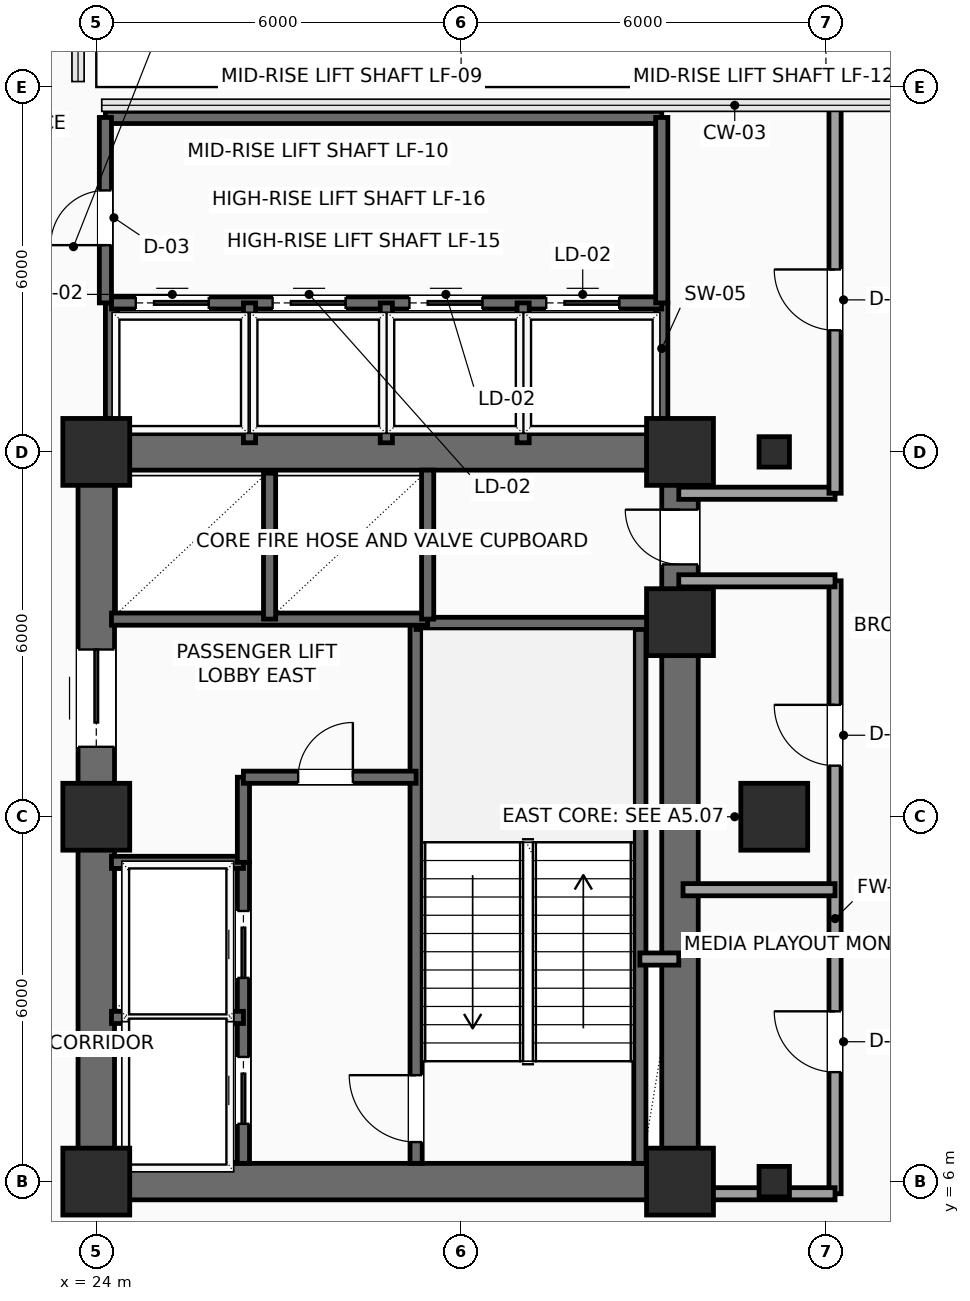
"""IFC4 building model, lengths in metres.
Left out: names, types, materials, properties, quantities, classifications, styles, units other than length and angle.
Written with IfcOpenShell. Run it as: python <this file> out.ifc"""

import sys

from ifc_helpers import new_model, si_unit, direction, frame, frame_2d, origin, origin_2d, place, context, subcontext, project, spatial, rectangle, hollow_rectangle, extrude, element, fill, save


model = new_model("IFC4")
c1 = context("Model", 3, precision=1e-05, world=origin(), true_north=direction((0.0, 1.0)))
c2 = subcontext(c1, "Body", "Model", "MODEL_VIEW")
j1 = project(units=[si_unit("LENGTHUNIT", "METRE"), si_unit("PLANEANGLEUNIT", "RADIAN")], contexts=[c1])
p1 = place(None, origin())
s1 = spatial("IfcSite", under=j1, at=p1, CompositionType="ELEMENT")
p2 = place(p1, origin())
s2 = spatial("IfcBuilding", under=s1, at=p2, CompositionType="ELEMENT")
p3 = place(p2, frame((0.0, 0.0, 119.4)))
s3 = spatial("IfcBuildingStorey", under=s2, at=p3, CompositionType="ELEMENT", Elevation=119.4)
for number, where, z_axis, x_axis in (
    (1, (24.0, 6.0, 0.0), (0.0, 0.0, 1.0), (1.0, 0.0, 0.0)),
    (2, (24.0, 12.0, 0.0), (0.0, 0.0, 1.0), (1.0, 0.0, 0.0)),
    (3, (24.0, 18.0, 0.0), (0.0, 0.0, 1.0), (1.0, 0.0, 0.0)),
    (4, (33.6, 6.0, 0.0), (0.0, 0.0, 1.0), (1.0, 0.0, 0.0)),
    (5, (33.6, 15.2, 0.0), (0.0, 0.0, 1.0), (1.0, 0.0, 0.0)),
    (6, (33.6, 18.0, 0.0), (0.0, 0.0, 1.0), (1.0, 0.0, 0.0)),
):
    element("IfcColumn", number, at=place(p3, frame(where, z_axis=z_axis, x_axis=x_axis)), inside=s3, PredefinedType="COLUMN", context=c2, shape_type="SweptSolid", body=[
        extrude(rectangle(XDim=1.1, YDim=1.1, at=origin_2d()), origin(), (0.0, 0.0, 1.0), 3.75),
    ])
p4 = place(p3, frame((35.15, 6.0, 0.0), z_axis=(0.0, 0.0, 1.0), x_axis=(1.0, 0.0, 0.0)))
e7 = element("IfcColumn", 7, at=p4, inside=s3, PredefinedType="COLUMN", context=c2, shape_type="SweptSolid", body=[
    extrude(hollow_rectangle(XDim=0.5, YDim=0.5, WallThickness=0.025, InnerFilletRadius=0.025, OuterFilletRadius=0.04, at=origin_2d()), origin(), (0.0, 0.0, 1.0), 3.75),
])
p5 = place(p3, frame((35.15, 12.0, 0.0), z_axis=(0.0, 0.0, 1.0), x_axis=(1.0, 0.0, 0.0)))
e8 = element("IfcColumn", 8, at=p5, inside=s3, PredefinedType="COLUMN", context=c2, shape_type="SweptSolid", body=[
    extrude(rectangle(XDim=1.1, YDim=1.1, at=origin_2d()), origin(), (0.0, 0.0, 1.0), 3.75),
])
p6 = place(p3, frame((35.15, 18.0, 0.0), z_axis=(0.0, 0.0, 1.0), x_axis=(1.0, 0.0, 0.0)))
e9 = element("IfcColumn", 9, at=p6, inside=s3, PredefinedType="COLUMN", context=c2, shape_type="SweptSolid", body=[
    extrude(hollow_rectangle(XDim=0.5, YDim=0.5, WallThickness=0.025, InnerFilletRadius=0.025, OuterFilletRadius=0.04, at=origin_2d()), origin(), (0.0, 0.0, 1.0), 3.75),
])
for number, where, z_axis, x_axis in (
    (10, (24.0, 6.0, 0.0), (0.0, 0.0, 1.0), (1.0, 0.0, 0.0)),
    (11, (24.0, 18.0, 0.0), (0.0, 0.0, 1.0), (1.0, 0.0, 0.0)),
):
    element("IfcWall", number, at=place(p3, frame(where, z_axis=z_axis, x_axis=x_axis)), inside=s3, PredefinedType="SHEAR", context=c2, shape_type="SweptSolid", body=[
        extrude(rectangle(XDim=9.6, YDim=0.6, at=frame_2d((4.8, 0.0))), origin(), (0.0, 0.0, 1.0), 3.525),
    ])
p7 = place(p3, frame((24.0, 6.0, 0.0), z_axis=(0.0, 0.0, 1.0), x_axis=(0.0, 1.0, 0.0)))
e12 = element("IfcWall", 12, at=p7, inside=s3, PredefinedType="SHEAR", context=c2, shape_type="SweptSolid", body=[
    extrude(rectangle(XDim=12.0, YDim=0.6, at=frame_2d((6.0, 0.0))), origin(), (0.0, 0.0, 1.0), 3.525),
])
p8 = place(p7, frame((7.15, 0.0, 0.0)))
e13 = element("IfcOpeningElement", 13, at=p8, cuts=e12, PredefinedType="OPENING", context=c2, shape_type="SweptSolid", body=[
    extrude(rectangle(XDim=1.6, YDim=2.3, at=frame_2d((0.8, 1.15))), frame((0.0, 0.31, 0.0), z_axis=(0.0, -1.0, 0.0), x_axis=(1.0, 0.0, 0.0)), (0.0, 0.0, 1.0), 0.62),
])
p9 = place(p3, frame((33.6, 6.0, 0.0), z_axis=(0.0, 0.0, 1.0), x_axis=(0.0, 1.0, 0.0)))
e14 = element("IfcWall", 14, at=p9, inside=s3, PredefinedType="SHEAR", context=c2, shape_type="SweptSolid", body=[
    extrude(rectangle(XDim=12.0, YDim=0.6, at=frame_2d((6.0, 0.0))), origin(), (0.0, 0.0, 1.0), 3.525),
])
p10 = place(p9, frame((10.15, 0.0, 0.0)))
e15 = element("IfcOpeningElement", 15, at=p10, cuts=e14, PredefinedType="OPENING", context=c2, shape_type="SweptSolid", body=[
    extrude(rectangle(XDim=0.9, YDim=2.15, at=frame_2d((0.45, 1.075))), frame((0.0, 0.31, 0.0), z_axis=(0.0, -1.0, 0.0), x_axis=(1.0, 0.0, 0.0)), (0.0, 0.0, 1.0), 0.62),
])
p11 = place(p3, frame((29.26, 6.3, 0.0), z_axis=(0.0, 0.0, 1.0), x_axis=(0.0, 1.0, 0.0)))
e16 = element("IfcWall", 16, at=p11, inside=s3, PredefinedType="SHEAR", context=c2, shape_type="SweptSolid", body=[
    extrude(rectangle(XDim=8.88, YDim=0.2, at=frame_2d((4.44, 0.0))), origin(), (0.0, 0.0, 1.0), 3.525),
])
p12 = place(p11, frame((0.35, 0.0, 0.0)))
e17 = element("IfcOpeningElement", 17, at=p12, cuts=e16, PredefinedType="OPENING", context=c2, shape_type="SweptSolid", body=[
    extrude(rectangle(XDim=1.1, YDim=2.2, at=frame_2d((0.55, 1.1))), frame((0.0, 0.11, 0.0), z_axis=(0.0, -1.0, 0.0), x_axis=(1.0, 0.0, 0.0)), (0.0, 0.0, 1.0), 0.22),
])
p13 = place(p3, frame((32.94, 6.3, 0.0), z_axis=(0.0, 0.0, 1.0), x_axis=(0.0, 1.0, 0.0)))
e18 = element("IfcWall", 18, at=p13, inside=s3, PredefinedType="SHEAR", context=c2, shape_type="SweptSolid", body=[
    extrude(rectangle(XDim=8.88, YDim=0.2, at=frame_2d((4.44, 0.0))), origin(), (0.0, 0.0, 1.0), 3.525),
])
p14 = place(p3, frame((29.26, 15.18, 0.0), z_axis=(0.0, 0.0, 1.0), x_axis=(1.0, 0.0, 0.0)))
e19 = element("IfcWall", 19, at=p14, inside=s3, PredefinedType="SHEAR", context=c2, shape_type="SweptSolid", body=[
    extrude(rectangle(XDim=4.04, YDim=0.2, at=frame_2d((2.02, 0.0))), origin(), (0.0, 0.0, 1.0), 3.525),
])
p15 = place(p3, frame((26.42, 6.3, 0.0), z_axis=(0.0, 0.0, 1.0), x_axis=(0.0, 1.0, 0.0)))
e20 = element("IfcWall", 20, at=p15, inside=s3, PredefinedType="SHEAR", context=c2, shape_type="SweptSolid", body=[
    extrude(rectangle(XDim=4.95, YDim=0.2, at=frame_2d((2.475, 0.0))), origin(), (0.0, 0.0, 1.0), 3.525),
])
p16 = place(p15, frame((0.65, 0.0, 0.0)))
e21 = element("IfcOpeningElement", 21, at=p16, cuts=e20, PredefinedType="OPENING", context=c2, shape_type="SweptSolid", body=[
    extrude(rectangle(XDim=1.1, YDim=2.2, at=frame_2d((0.55, 1.1))), frame((0.0, 0.11, 0.0), z_axis=(0.0, -1.0, 0.0), x_axis=(1.0, 0.0, 0.0)), (0.0, 0.0, 1.0), 0.22),
])
p17 = place(p15, frame((3.05, 0.0, 0.0)))
e22 = element("IfcOpeningElement", 22, at=p17, cuts=e20, PredefinedType="OPENING", context=c2, shape_type="SweptSolid", body=[
    extrude(rectangle(XDim=1.1, YDim=2.2, at=frame_2d((0.55, 1.1))), frame((0.0, 0.11, 0.0), z_axis=(0.0, -1.0, 0.0), x_axis=(1.0, 0.0, 0.0)), (0.0, 0.0, 1.0), 0.22),
])
for number, where, z_axis, x_axis in (
    (23, (24.25, 8.7, 0.0), (0.0, 0.0, 1.0), (1.0, 0.0, 0.0)),
    (24, (24.25, 11.25, 0.0), (0.0, 0.0, 1.0), (1.0, 0.0, 0.0)),
):
    element("IfcWall", number, at=place(p3, frame(where, z_axis=z_axis, x_axis=x_axis)), inside=s3, PredefinedType="SHEAR", context=c2, shape_type="SweptSolid", body=[
        extrude(rectangle(XDim=2.17, YDim=0.2, at=frame_2d((1.085, 0.0))), origin(), (0.0, 0.0, 1.0), 3.525),
    ])
p18 = place(p3, frame((26.42, 11.25, 0.0), z_axis=(0.0, 0.0, 1.0), x_axis=(0.0, 1.0, 0.0)))
e25 = element("IfcWall", 25, at=p18, inside=s3, PredefinedType="SHEAR", context=c2, shape_type="SweptSolid", body=[
    extrude(rectangle(XDim=1.4, YDim=0.2, at=frame_2d((0.7, 0.0))), origin(), (0.0, 0.0, 1.0), 3.525),
])
p19 = place(p3, frame((26.42, 12.65, 0.0), z_axis=(0.0, 0.0, 1.0), x_axis=(1.0, 0.0, 0.0)))
e26 = element("IfcWall", 26, at=p19, inside=s3, PredefinedType="SHEAR", context=c2, shape_type="SweptSolid", body=[
    extrude(rectangle(XDim=2.84, YDim=0.2, at=frame_2d((1.42, 0.0))), origin(), (0.0, 0.0, 1.0), 3.525),
])
p20 = place(p19, frame((0.9, 0.0, 0.0)))
e27 = element("IfcOpeningElement", 27, at=p20, cuts=e26, PredefinedType="OPENING", context=c2, shape_type="SweptSolid", body=[
    extrude(rectangle(XDim=0.9, YDim=2.15, at=frame_2d((0.45, 1.075))), frame((0.0, 0.11, 0.0), z_axis=(0.0, -1.0, 0.0), x_axis=(1.0, 0.0, 0.0)), (0.0, 0.0, 1.0), 0.22),
])
p21 = place(p3, frame((32.94, 9.66, 0.0), z_axis=(0.0, 0.0, 1.0), x_axis=(1.0, 0.0, 0.0)))
e28 = element("IfcWall", 28, at=p21, inside=s3, PredefinedType="SOLIDWALL", context=c2, shape_type="SweptSolid", body=[
    extrude(rectangle(XDim=0.64, YDim=0.2, at=frame_2d((0.32, 0.0))), origin(), (0.0, 0.0, 1.0), 3.525),
])
p22 = place(p3, frame((24.25, 15.25, 0.0), z_axis=(0.0, 0.0, 1.0), x_axis=(1.0, 0.0, 0.0)))
e29 = element("IfcWall", 29, at=p22, inside=s3, PredefinedType="SHEAR", context=c2, shape_type="SweptSolid", body=[
    extrude(rectangle(XDim=5.2, YDim=0.2, at=frame_2d((2.6, 0.0))), origin(), (0.0, 0.0, 1.0), 3.525),
])
p23 = place(p3, frame((26.85, 15.25, 0.0), z_axis=(0.0, 0.0, 1.0), x_axis=(0.0, 1.0, 0.0)))
e30 = element("IfcWall", 30, at=p23, inside=s3, PredefinedType="SHEAR", context=c2, shape_type="SweptSolid", body=[
    extrude(rectangle(XDim=2.4, YDim=0.2, at=frame_2d((1.2, 0.0))), origin(), (0.0, 0.0, 1.0), 3.525),
])
p24 = place(p3, frame((29.45, 15.25, 0.0), z_axis=(0.0, 0.0, 1.0), x_axis=(0.0, 1.0, 0.0)))
e31 = element("IfcWall", 31, at=p24, inside=s3, PredefinedType="SHEAR", context=c2, shape_type="SweptSolid", body=[
    extrude(rectangle(XDim=2.45, YDim=0.2, at=frame_2d((1.225, 0.0))), origin(), (0.0, 0.0, 1.0), 3.525),
])
for number, where, z_axis, x_axis in (
    (32, (33.3, 18.1, 0.0), (0.0, 0.0, 1.0), (0.0, 1.0, 0.0)),
    (33, (24.25, 18.1, 0.0), (0.0, 0.0, 1.0), (0.0, 1.0, 0.0)),
):
    element("IfcWall", number, at=place(p3, frame(where, z_axis=z_axis, x_axis=x_axis)), inside=s3, PredefinedType="SHEAR", context=c2, shape_type="SweptSolid", body=[
        extrude(rectangle(XDim=2.35, YDim=0.2, at=frame_2d((1.175, 0.0))), origin(), (0.0, 0.0, 1.0), 3.525),
    ])
p25 = place(p3, frame((24.25, 20.45, 0.0), z_axis=(0.0, 0.0, 1.0), x_axis=(1.0, 0.0, 0.0)))
e34 = element("IfcWall", 34, at=p25, inside=s3, PredefinedType="SHEAR", context=c2, shape_type="SweptSolid", body=[
    extrude(rectangle(XDim=9.05, YDim=0.2, at=frame_2d((4.525, 0.0))), origin(), (0.0, 0.0, 1.0), 3.525),
])
p26 = place(p25, frame((0.4, 0.0, 0.0)))
e35 = element("IfcOpeningElement", 35, at=p26, cuts=e34, PredefinedType="OPENING", context=c2, shape_type="SweptSolid", body=[
    extrude(rectangle(XDim=1.2, YDim=2.2, at=frame_2d((0.6, 1.1))), frame((0.0, 0.11, 0.0), z_axis=(0.0, -1.0, 0.0), x_axis=(1.0, 0.0, 0.0)), (0.0, 0.0, 1.0), 0.22),
])
p27 = place(p25, frame((2.65, 0.0, 0.0)))
e36 = element("IfcOpeningElement", 36, at=p27, cuts=e34, PredefinedType="OPENING", context=c2, shape_type="SweptSolid", body=[
    extrude(rectangle(XDim=1.2, YDim=2.2, at=frame_2d((0.6, 1.1))), frame((0.0, 0.11, 0.0), z_axis=(0.0, -1.0, 0.0), x_axis=(1.0, 0.0, 0.0)), (0.0, 0.0, 1.0), 0.22),
])
p28 = place(p25, frame((4.9, 0.0, 0.0)))
e37 = element("IfcOpeningElement", 37, at=p28, cuts=e34, PredefinedType="OPENING", context=c2, shape_type="SweptSolid", body=[
    extrude(rectangle(XDim=1.2, YDim=2.2, at=frame_2d((0.6, 1.1))), frame((0.0, 0.11, 0.0), z_axis=(0.0, -1.0, 0.0), x_axis=(1.0, 0.0, 0.0)), (0.0, 0.0, 1.0), 0.22),
])
p29 = place(p25, frame((7.15, 0.0, 0.0)))
e38 = element("IfcOpeningElement", 38, at=p29, cuts=e34, PredefinedType="OPENING", context=c2, shape_type="SweptSolid", body=[
    extrude(rectangle(XDim=1.2, YDim=2.2, at=frame_2d((0.6, 1.1))), frame((0.0, 0.11, 0.0), z_axis=(0.0, -1.0, 0.0), x_axis=(1.0, 0.0, 0.0)), (0.0, 0.0, 1.0), 0.22),
])
for number, where, z_axis, x_axis in (
    (39, (26.52, 18.15, 0.0), (0.0, 0.0, 1.0), (0.0, 1.0, 0.0)),
    (40, (28.77, 18.15, 0.0), (0.0, 0.0, 1.0), (0.0, 1.0, 0.0)),
    (41, (31.02, 18.15, 0.0), (0.0, 0.0, 1.0), (0.0, 1.0, 0.0)),
):
    element("IfcWall", number, at=place(p3, frame(where, z_axis=z_axis, x_axis=x_axis)), inside=s3, PredefinedType="SHEAR", context=c2, shape_type="SweptSolid", body=[
        extrude(rectangle(XDim=2.3, YDim=0.2, at=frame_2d((1.15, 0.0))), origin(), (0.0, 0.0, 1.0), 3.525),
    ])
p30 = place(p3, frame((24.15, 23.5, 0.0), z_axis=(0.0, 0.0, 1.0), x_axis=(1.0, 0.0, 0.0)))
e42 = element("IfcWall", 42, at=p30, inside=s3, PredefinedType="SHEAR", context=c2, shape_type="SweptSolid", body=[
    extrude(rectangle(XDim=9.15, YDim=0.2, at=frame_2d((4.575, 0.0))), origin(), (0.0, 0.0, 1.0), 3.525),
])
p31 = place(p3, frame((33.3, 20.45, 0.0), z_axis=(0.0, 0.0, 1.0), x_axis=(0.0, 1.0, 0.0)))
e43 = element("IfcWall", 43, at=p31, inside=s3, PredefinedType="SHEAR", context=c2, shape_type="SweptSolid", body=[
    extrude(rectangle(XDim=3.05, YDim=0.2, at=frame_2d((1.525, 0.0))), origin(), (0.0, 0.0, 1.0), 3.525),
])
p32 = place(p3, frame((24.15, 20.45, 0.0), z_axis=(0.0, 0.0, 1.0), x_axis=(0.0, 1.0, 0.0)))
e44 = element("IfcWall", 44, at=p32, inside=s3, PredefinedType="SHEAR", context=c2, shape_type="SweptSolid", body=[
    extrude(rectangle(XDim=3.05, YDim=0.2, at=frame_2d((1.525, 0.0))), origin(), (0.0, 0.0, 1.0), 3.525),
])
p33 = place(p32, frame((0.95, 0.0, 0.0)))
e45 = element("IfcOpeningElement", 45, at=p33, cuts=e44, PredefinedType="OPENING", context=c2, shape_type="SweptSolid", body=[
    extrude(rectangle(XDim=0.9, YDim=2.15, at=frame_2d((0.45, 1.075))), frame((0.0, 0.11, 0.0), z_axis=(0.0, -1.0, 0.0), x_axis=(1.0, 0.0, 0.0)), (0.0, 0.0, 1.0), 0.22),
])
p34 = place(p3, frame((36.15, 5.8, 0.0), z_axis=(0.0, 0.0, 1.0), x_axis=(0.0, 1.0, 0.0)))
e46 = element("IfcWall", 46, at=p34, inside=s3, PredefinedType="SOLIDWALL", context=c2, shape_type="SweptSolid", body=[
    extrude(rectangle(XDim=10.08, YDim=0.2, at=frame_2d((5.04, 0.0))), origin(), (0.0, 0.0, 1.0), 3.525),
])
p35 = place(p34, frame((2.0, 0.0, 0.0)))
e47 = element("IfcOpeningElement", 47, at=p35, cuts=e46, PredefinedType="OPENING", context=c2, shape_type="SweptSolid", body=[
    extrude(rectangle(XDim=1.0, YDim=2.2, at=frame_2d((0.5, 1.1))), frame((0.0, 0.11, 0.0), z_axis=(0.0, -1.0, 0.0), x_axis=(1.0, 0.0, 0.0)), (0.0, 0.0, 1.0), 0.22),
])
p36 = place(p34, frame((7.04, 0.0, 0.0)))
e48 = element("IfcOpeningElement", 48, at=p36, cuts=e46, PredefinedType="OPENING", context=c2, shape_type="SweptSolid", body=[
    extrude(rectangle(XDim=1.0, YDim=2.2, at=frame_2d((0.5, 1.1))), frame((0.0, 0.11, 0.0), z_axis=(0.0, -1.0, 0.0), x_axis=(1.0, 0.0, 0.0)), (0.0, 0.0, 1.0), 0.22),
])
for number, where, z_axis, x_axis in (
    (49, (36.15, 15.88, 0.0), (0.0, 0.0, 1.0), (-1.0, 0.0, 0.0)),
    (50, (33.58, 17.32, 0.0), (0.0, 0.0, 1.0), (1.0, 0.0, 0.0)),
):
    element("IfcWall", number, at=place(p3, frame(where, z_axis=z_axis, x_axis=x_axis)), inside=s3, PredefinedType="SOLIDWALL", context=c2, shape_type="SweptSolid", body=[
        extrude(rectangle(XDim=2.57, YDim=0.2, at=frame_2d((1.285, 0.0))), origin(), (0.0, 0.0, 1.0), 3.525),
    ])
p37 = place(p3, frame((36.15, 17.32, 0.0), z_axis=(0.0, 0.0, 1.0), x_axis=(0.0, 1.0, 0.0)))
e51 = element("IfcWall", 51, at=p37, inside=s3, PredefinedType="SOLIDWALL", context=c2, shape_type="SweptSolid", body=[
    extrude(rectangle(XDim=6.38, YDim=0.2, at=frame_2d((3.19, 0.0))), origin(), (0.0, 0.0, 1.0), 3.525),
])
p38 = place(p37, frame((2.68, 0.0, 0.0)))
e52 = element("IfcOpeningElement", 52, at=p38, cuts=e51, PredefinedType="OPENING", context=c2, shape_type="SweptSolid", body=[
    extrude(rectangle(XDim=1.0, YDim=2.2, at=frame_2d((0.5, 1.1))), frame((0.0, 0.11, 0.0), z_axis=(0.0, -1.0, 0.0), x_axis=(1.0, 0.0, 0.0)), (0.0, 0.0, 1.0), 0.22),
])
p39 = place(p3, frame((33.65, 5.8, 0.0), z_axis=(0.0, 0.0, 1.0), x_axis=(1.0, 0.0, 0.0)))
e53 = element("IfcWall", 53, at=p39, inside=s3, PredefinedType="PARTITIONING", context=c2, shape_type="SweptSolid", body=[
    extrude(rectangle(XDim=2.5, YDim=0.2, at=frame_2d((1.25, 0.0))), origin(), (0.0, 0.0, 1.0), 3.017),
])
p40 = place(p3, frame((33.65, 10.8, 0.0), z_axis=(0.0, 0.0, 1.0), x_axis=(1.0, 0.0, 0.0)))
e54 = element("IfcWall", 54, at=p40, inside=s3, PredefinedType="PARTITIONING", context=c2, shape_type="SweptSolid", body=[
    extrude(rectangle(XDim=2.5, YDim=0.2, at=frame_2d((1.25, 0.0))), origin(), (0.0, 0.0, 1.0), 3.525),
])
p41 = place(p8, origin())
e55 = element("IfcDoor", 55, at=p41, inside=s3, OperationType="DOUBLE_DOOR_SLIDING", PredefinedType="DOOR", context=c2, shape_type="SweptSolid", body=[
    extrude(rectangle(XDim=1.6, YDim=2.3, at=frame_2d((0.8, 1.15))), frame((0.0, 0.025, 0.0), z_axis=(0.0, -1.0, 0.0), x_axis=(1.0, 0.0, 0.0)), (0.0, 0.0, 1.0), 0.05),
])
fill(e13, e55)
p42 = place(p10, origin())
e56 = element("IfcDoor", 56, at=p42, inside=s3, OperationType="SINGLE_SWING_RIGHT", PredefinedType="DOOR", context=c2, shape_type="SweptSolid", body=[
    extrude(rectangle(XDim=0.9, YDim=2.15, at=frame_2d((0.45, 1.075))), frame((0.0, 0.025, 0.0), z_axis=(0.0, -1.0, 0.0), x_axis=(1.0, 0.0, 0.0)), (0.0, 0.0, 1.0), 0.05),
])
fill(e15, e56)
p43 = place(p12, origin())
e57 = element("IfcDoor", 57, at=p43, inside=s3, OperationType="SINGLE_SWING_RIGHT", PredefinedType="DOOR", context=c2, shape_type="SweptSolid", body=[
    extrude(rectangle(XDim=1.1, YDim=2.2, at=frame_2d((0.55, 1.1))), frame((0.0, 0.025, 0.0), z_axis=(0.0, -1.0, 0.0), x_axis=(1.0, 0.0, 0.0)), (0.0, 0.0, 1.0), 0.05),
])
fill(e17, e57)
p44 = place(p16, origin())
e58 = element("IfcDoor", 58, at=p44, inside=s3, OperationType="SLIDING_TO_LEFT", PredefinedType="DOOR", context=c2, shape_type="SweptSolid", body=[
    extrude(rectangle(XDim=1.1, YDim=2.2, at=frame_2d((0.55, 1.1))), frame((0.0, 0.025, 0.0), z_axis=(0.0, -1.0, 0.0), x_axis=(1.0, 0.0, 0.0)), (0.0, 0.0, 1.0), 0.05),
])
fill(e21, e58)
p45 = place(p17, origin())
e59 = element("IfcDoor", 59, at=p45, inside=s3, OperationType="SLIDING_TO_LEFT", PredefinedType="DOOR", context=c2, shape_type="SweptSolid", body=[
    extrude(rectangle(XDim=1.1, YDim=2.2, at=frame_2d((0.55, 1.1))), frame((0.0, 0.025, 0.0), z_axis=(0.0, -1.0, 0.0), x_axis=(1.0, 0.0, 0.0)), (0.0, 0.0, 1.0), 0.05),
])
fill(e22, e59)
p46 = place(p20, origin())
e60 = element("IfcDoor", 60, at=p46, inside=s3, OperationType="SINGLE_SWING_RIGHT", PredefinedType="DOOR", context=c2, shape_type="SweptSolid", body=[
    extrude(rectangle(XDim=0.9, YDim=2.15, at=frame_2d((0.45, 1.075))), frame((0.0, 0.025, 0.0), z_axis=(0.0, -1.0, 0.0), x_axis=(1.0, 0.0, 0.0)), (0.0, 0.0, 1.0), 0.05),
])
fill(e27, e60)
p47 = place(p26, origin())
e61 = element("IfcDoor", 61, at=p47, inside=s3, OperationType="SLIDING_TO_RIGHT", PredefinedType="DOOR", context=c2, shape_type="SweptSolid", body=[
    extrude(rectangle(XDim=1.2, YDim=2.2, at=frame_2d((0.6, 1.1))), frame((0.0, 0.025, 0.0), z_axis=(0.0, -1.0, 0.0), x_axis=(1.0, 0.0, 0.0)), (0.0, 0.0, 1.0), 0.05),
])
fill(e35, e61)
p48 = place(p27, origin())
e62 = element("IfcDoor", 62, at=p48, inside=s3, OperationType="SLIDING_TO_RIGHT", PredefinedType="DOOR", context=c2, shape_type="SweptSolid", body=[
    extrude(rectangle(XDim=1.2, YDim=2.2, at=frame_2d((0.6, 1.1))), frame((0.0, 0.025, 0.0), z_axis=(0.0, -1.0, 0.0), x_axis=(1.0, 0.0, 0.0)), (0.0, 0.0, 1.0), 0.05),
])
fill(e36, e62)
p49 = place(p28, origin())
e63 = element("IfcDoor", 63, at=p49, inside=s3, OperationType="SLIDING_TO_RIGHT", PredefinedType="DOOR", context=c2, shape_type="SweptSolid", body=[
    extrude(rectangle(XDim=1.2, YDim=2.2, at=frame_2d((0.6, 1.1))), frame((0.0, 0.025, 0.0), z_axis=(0.0, -1.0, 0.0), x_axis=(1.0, 0.0, 0.0)), (0.0, 0.0, 1.0), 0.05),
])
fill(e37, e63)
p50 = place(p29, origin())
e64 = element("IfcDoor", 64, at=p50, inside=s3, OperationType="SLIDING_TO_RIGHT", PredefinedType="DOOR", context=c2, shape_type="SweptSolid", body=[
    extrude(rectangle(XDim=1.2, YDim=2.2, at=frame_2d((0.6, 1.1))), frame((0.0, 0.025, 0.0), z_axis=(0.0, -1.0, 0.0), x_axis=(1.0, 0.0, 0.0)), (0.0, 0.0, 1.0), 0.05),
])
fill(e38, e64)
p51 = place(p33, origin())
e65 = element("IfcDoor", 65, at=p51, inside=s3, OperationType="SINGLE_SWING_LEFT", PredefinedType="DOOR", context=c2, shape_type="SweptSolid", body=[
    extrude(rectangle(XDim=0.9, YDim=2.15, at=frame_2d((0.45, 1.075))), frame((0.0, 0.025, 0.0), z_axis=(0.0, -1.0, 0.0), x_axis=(1.0, 0.0, 0.0)), (0.0, 0.0, 1.0), 0.05),
])
fill(e45, e65)
p52 = place(p35, origin())
e66 = element("IfcDoor", 66, at=p52, inside=s3, OperationType="SINGLE_SWING_RIGHT", PredefinedType="DOOR", context=c2, shape_type="SweptSolid", body=[
    extrude(rectangle(XDim=1.0, YDim=2.2, at=frame_2d((0.5, 1.1))), frame((0.0, 0.025, 0.0), z_axis=(0.0, -1.0, 0.0), x_axis=(1.0, 0.0, 0.0)), (0.0, 0.0, 1.0), 0.05),
])
fill(e47, e66)
p53 = place(p36, origin())
e67 = element("IfcDoor", 67, at=p53, inside=s3, OperationType="SINGLE_SWING_RIGHT", PredefinedType="DOOR", context=c2, shape_type="SweptSolid", body=[
    extrude(rectangle(XDim=1.0, YDim=2.2, at=frame_2d((0.5, 1.1))), frame((0.0, 0.025, 0.0), z_axis=(0.0, -1.0, 0.0), x_axis=(1.0, 0.0, 0.0)), (0.0, 0.0, 1.0), 0.05),
])
fill(e48, e67)
p54 = place(p38, origin())
e68 = element("IfcDoor", 68, at=p54, inside=s3, OperationType="SINGLE_SWING_RIGHT", PredefinedType="DOOR", context=c2, shape_type="SweptSolid", body=[
    extrude(rectangle(XDim=1.0, YDim=2.2, at=frame_2d((0.5, 1.1))), frame((0.0, 0.025, 0.0), z_axis=(0.0, -1.0, 0.0), x_axis=(1.0, 0.0, 0.0)), (0.0, 0.0, 1.0), 0.05),
])
fill(e52, e68)
save(model, sys.argv[1])
